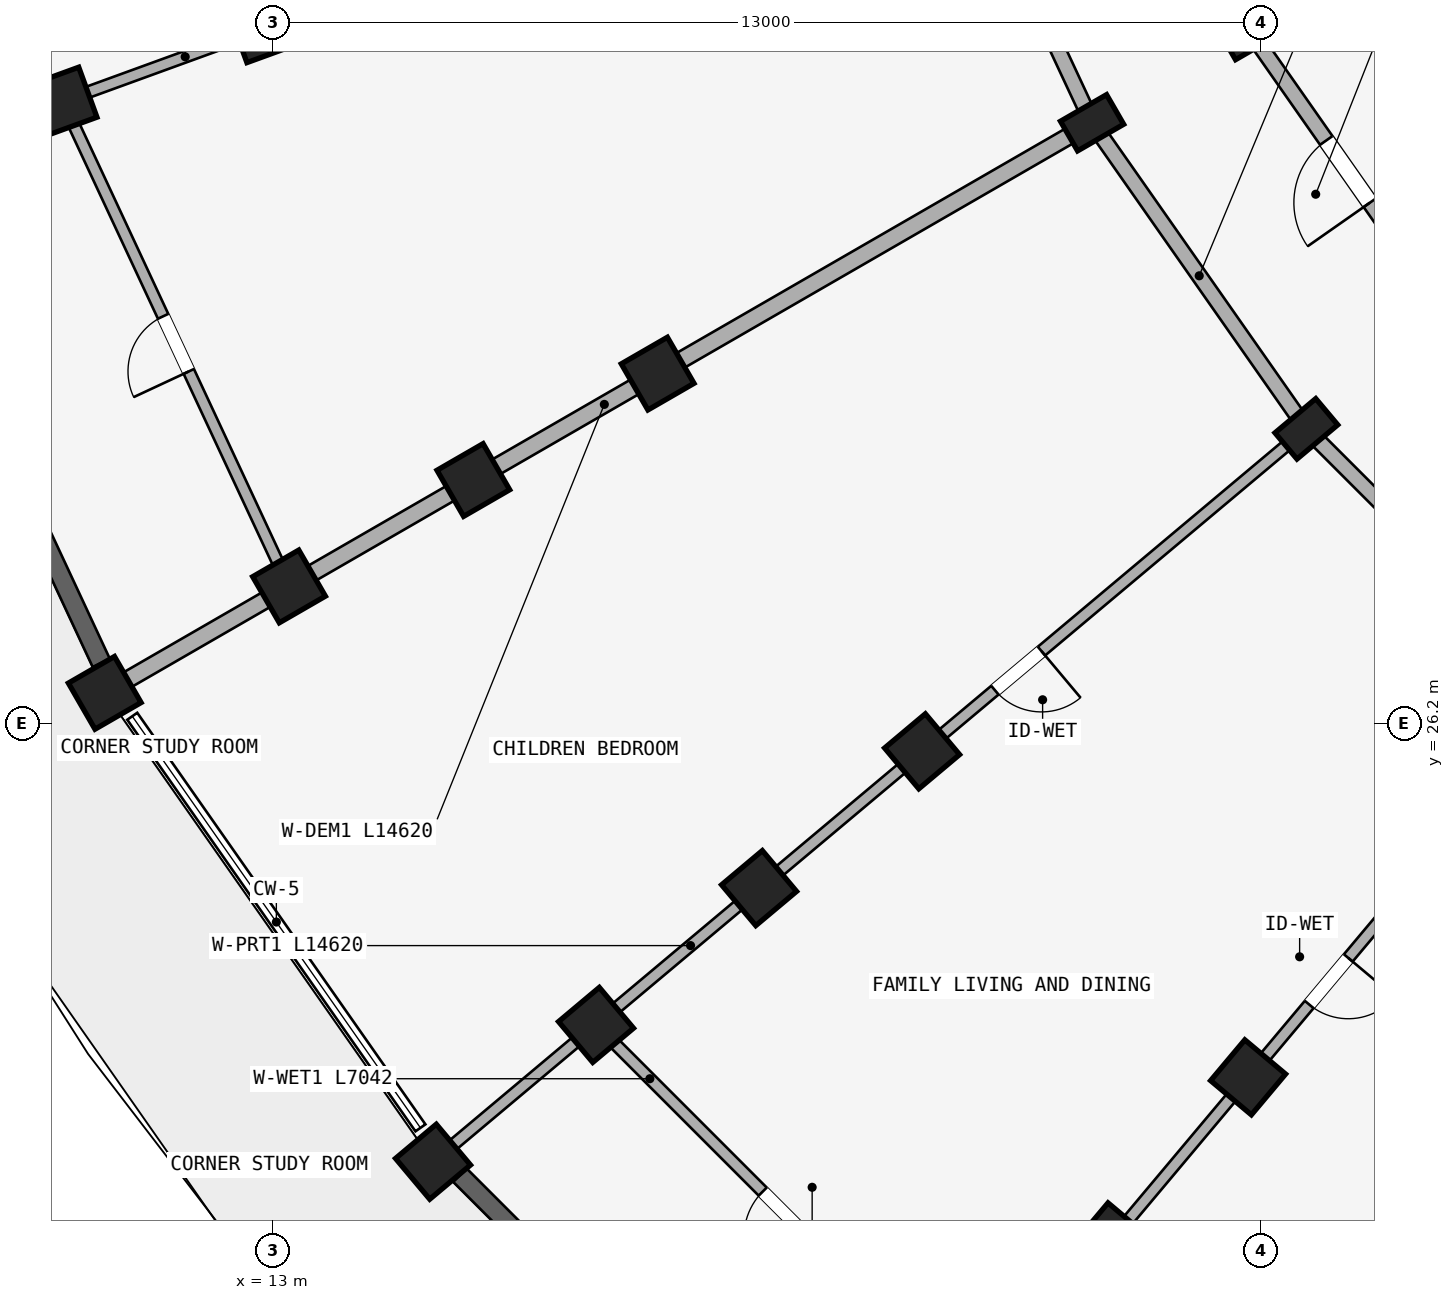
"""IFC4 building model, lengths in metres.
Left out: names, types, materials, properties, quantities, classifications, styles, units other than length and angle.
Written with IfcOpenShell. Run it as: python <this file> out.ifc"""

import sys

from ifc_helpers import new_model, si_unit, direction, frame, frame_2d, origin, origin_2d, place, context, subcontext, project, spatial, rectangle, extrude, element, fill, save


model = new_model("IFC4")
c1 = context("Model", 3, precision=1e-05, world=origin(), true_north=direction((0.0, 1.0)))
c2 = subcontext(c1, "Body", "Model", "MODEL_VIEW")
j1 = project(units=[si_unit("LENGTHUNIT", "METRE"), si_unit("PLANEANGLEUNIT", "RADIAN")], contexts=[c1])
p1 = place(None, origin())
s1 = spatial("IfcSite", under=j1, at=p1, CompositionType="ELEMENT")
p2 = place(p1, origin())
s2 = spatial("IfcBuilding", under=s1, at=p2, CompositionType="ELEMENT")
p3 = place(p2, frame((0.0, 0.0, 21.3)))
s3 = spatial("IfcBuildingStorey", under=s2, at=p3, CompositionType="ELEMENT", Elevation=21.3)
for number, where, z_axis, x_axis in (
    (1, (25.831, 21.542, 0.0), (0.0, 0.0, 1.0), (-0.766, 0.643, 0.0)),
    (2, (24.031, 19.397, 0.0), (0.0, 0.0, 1.0), (-0.766, 0.643, 0.0)),
):
    element("IfcColumn", number, at=place(p3, frame(where, z_axis=z_axis, x_axis=x_axis)), inside=s3, PredefinedType="COLUMN", context=c2, shape_type="SweptSolid", body=[
        extrude(rectangle(XDim=0.7, YDim=0.7, at=origin_2d()), origin(), (0.0, 0.0, 1.0), 2.93),
    ])
p4 = place(p3, frame((26.598, 30.073, 0.0), z_axis=(0.0, 0.0, 1.0), x_axis=(-0.642787609687, 0.766044443119, 0.0)))
e3 = element("IfcColumn", 3, at=p4, inside=s3, PredefinedType="COLUMN", context=c2, shape_type="SweptSolid", body=[
    extrude(rectangle(XDim=0.45, YDim=0.7, at=origin_2d()), origin(), (0.0, 0.0, 1.0), 2.93),
])
for number, where, z_axis, x_axis in (
    (4, (21.542, 25.831, 0.0), (0.0, 0.0, 1.0), (-0.643, 0.766, 0.0)),
    (5, (19.397, 24.031, 0.0), (0.0, 0.0, 1.0), (-0.643, 0.766, 0.0)),
    (6, (17.252, 22.231, 0.0), (0.0, 0.0, 1.0), (-0.643, 0.766, 0.0)),
):
    element("IfcColumn", number, at=place(p3, frame(where, z_axis=z_axis, x_axis=x_axis)), inside=s3, PredefinedType="COLUMN", context=c2, shape_type="SweptSolid", body=[
        extrude(rectangle(XDim=0.7, YDim=0.7, at=origin_2d()), origin(), (0.0, 0.0, 1.0), 2.93),
    ])
p5 = place(p3, frame((15.107, 20.432, 0.0), z_axis=(0.0, 0.0, 1.0), x_axis=(-0.642787609687, 0.766044443119, 0.0)))
e7 = element("IfcColumn", 7, at=p5, inside=s3, PredefinedType="COLUMN", context=c2, shape_type="SweptSolid", body=[
    extrude(rectangle(XDim=0.7, YDim=0.7, at=origin_2d()), origin(), (0.0, 0.0, 1.0), 2.97),
])
for number, where, z_axis, x_axis in (
    (8, (25.856, 35.3, 0.0), (0.0, 0.0, 1.0), (-0.5, 0.866, 0.0)),
    (9, (23.778, 34.1, 0.0), (0.0, 0.0, 1.0), (-0.5, 0.866, 0.0)),
):
    element("IfcColumn", number, at=place(p3, frame(where, z_axis=z_axis, x_axis=x_axis)), inside=s3, PredefinedType="COLUMN", context=c2, shape_type="SweptSolid", body=[
        extrude(rectangle(XDim=0.45, YDim=0.7, at=origin_2d()), origin(), (0.0, 0.0, 1.0), 2.93),
    ])
for number, where, z_axis, x_axis in (
    (10, (18.062, 30.8, 0.0), (0.0, 0.0, 1.0), (-0.5, 0.866, 0.0)),
    (11, (15.637, 29.4, 0.0), (0.0, 0.0, 1.0), (-0.5, 0.866, 0.0)),
    (12, (13.213, 28.0, 0.0), (0.0, 0.0, 1.0), (-0.5, 0.866, 0.0)),
):
    element("IfcColumn", number, at=place(p3, frame(where, z_axis=z_axis, x_axis=x_axis)), inside=s3, PredefinedType="COLUMN", context=c2, shape_type="SweptSolid", body=[
        extrude(rectangle(XDim=0.7, YDim=0.7, at=origin_2d()), origin(), (0.0, 0.0, 1.0), 2.93),
    ])
p6 = place(p3, frame((10.788, 26.6, 0.0), z_axis=(0.0, 0.0, 1.0), x_axis=(-0.5, 0.866025403784, 0.0)))
e13 = element("IfcColumn", 13, at=p6, inside=s3, PredefinedType="COLUMN", context=c2, shape_type="SweptSolid", body=[
    extrude(rectangle(XDim=0.7, YDim=0.7, at=origin_2d()), origin(), (0.0, 0.0, 1.0), 2.97),
])
for number, where, z_axis, x_axis in (
    (14, (12.868, 35.34, 0.0), (0.0, 0.0, 1.0), (-0.342, 0.94, 0.0)),
    (15, (10.236, 34.382, 0.0), (0.0, 0.0, 1.0), (-0.342, 0.94, 0.0)),
):
    element("IfcColumn", number, at=place(p3, frame(where, z_axis=z_axis, x_axis=x_axis)), inside=s3, PredefinedType="COLUMN", context=c2, shape_type="SweptSolid", body=[
        extrude(rectangle(XDim=0.7, YDim=0.7, at=origin_2d()), origin(), (0.0, 0.0, 1.0), 2.93),
    ])
p7 = place(p3, frame((30.073, 26.598, 0.0), z_axis=(0.0, 0.0, 1.0), x_axis=(-0.707106781187, 0.707106781187, 0.0)))
e16 = element("IfcWall", 16, at=p7, inside=s3, PredefinedType="STANDARD", context=c2, shape_type="SweptSolid", body=[
    extrude(rectangle(XDim=4.916, YDim=0.2, at=frame_2d((2.458, 0.0))), origin(), (0.0, 0.0, 1.0), 2.372),
])
p8 = place(p3, frame((28.436, 31.616, 0.0), z_axis=(0.0, 0.0, 1.0), x_axis=(-0.573571637217, 0.819155404658, 0.0)))
e17 = element("IfcWall", 17, at=p8, inside=s3, PredefinedType="STANDARD", context=c2, shape_type="SweptSolid", body=[
    extrude(rectangle(XDim=4.497, YDim=0.2, at=frame_2d((2.249, 0.0))), origin(), (0.0, 0.0, 1.0), 2.372),
])
p9 = place(p8, frame((1.749, 0.0, 0.0)))
e18 = element("IfcOpeningElement", 18, at=p9, cuts=e17, PredefinedType="OPENING", context=c2, shape_type="SweptSolid", body=[
    extrude(rectangle(XDim=1.0, YDim=2.15, at=frame_2d((0.5, 1.075))), frame((0.0, 0.11, 0.0), z_axis=(0.0, -1.0, 0.0), x_axis=(1.0, 0.0, 0.0)), (0.0, 0.0, 1.0), 0.22),
])
p10 = place(p3, frame((26.598, 30.073, 0.0), z_axis=(0.0, 0.0, 1.0), x_axis=(-0.573592335331, 0.819140911474, 0.0)))
e19 = element("IfcWall", 19, at=p10, inside=s3, PredefinedType="STANDARD", context=c2, shape_type="SweptSolid", body=[
    extrude(rectangle(XDim=4.916, YDim=0.2, at=frame_2d((2.458, 0.0))), origin(), (0.0, 0.0, 1.0), 2.372),
])
p11 = place(p3, frame((23.778, 34.1, 0.0), z_axis=(0.0, 0.0, 1.0), x_axis=(-0.422629854778, 0.906302381024, 0.0)))
e20 = element("IfcWall", 20, at=p11, inside=s3, PredefinedType="STANDARD", context=c2, shape_type="SweptSolid", body=[
    extrude(rectangle(XDim=4.915, YDim=0.2, at=frame_2d((2.458, 0.0))), origin(), (0.0, 0.0, 1.0), 2.372),
])
p12 = place(p11, frame((1.888, 0.0, 0.0)))
e21 = element("IfcOpeningElement", 21, at=p12, cuts=e20, PredefinedType="OPENING", context=c2, shape_type="SweptSolid", body=[
    extrude(rectangle(XDim=1.14, YDim=2.15, at=frame_2d((0.57, 1.075))), frame((0.0, 0.11, 0.0), z_axis=(0.0, -1.0, 0.0), x_axis=(1.0, 0.0, 0.0)), (0.0, 0.0, 1.0), 0.22),
])
p13 = place(p3, frame((34.05, 23.691, 0.0), z_axis=(0.0, 0.0, 1.0), x_axis=(-0.500007702989, -0.866020956416, 0.0)))
e22 = element("IfcWall", 22, at=p13, inside=s3, PredefinedType="STANDARD", context=c2, shape_type="SweptSolid", body=[
    extrude(rectangle(XDim=14.62, YDim=0.22, at=frame_2d((7.31, 0.0))), origin(), (0.0, 0.0, 1.0), 2.372),
])
p14 = place(p3, frame((30.009, 26.521, 0.0), z_axis=(0.0, 0.0, 1.0), x_axis=(-0.642779216656, -0.76605148563, 0.0)))
e23 = element("IfcWall", 23, at=p14, inside=s3, PredefinedType="PARTITIONING", context=c2, shape_type="SweptSolid", body=[
    extrude(rectangle(XDim=14.62, YDim=0.15, at=frame_2d((7.31, 0.0))), origin(), (0.0, 0.0, 1.0), 2.372),
])
p15 = place(p14, frame((4.449, 0.0, 0.0)))
e24 = element("IfcOpeningElement", 24, at=p15, cuts=e23, PredefinedType="OPENING", context=c2, shape_type="SweptSolid", body=[
    extrude(rectangle(XDim=0.8, YDim=2.1, at=frame_2d((0.4, 1.05))), frame((0.0, 0.085, 0.0), z_axis=(0.0, -1.0, 0.0), x_axis=(1.0, 0.0, 0.0)), (0.0, 0.0, 1.0), 0.17),
])
p16 = place(p3, frame((26.521, 30.009, 0.0), z_axis=(0.0, 0.0, 1.0), x_axis=(-0.76605148563, -0.642779216656, 0.0)))
e25 = element("IfcWall", 25, at=p16, inside=s3, PredefinedType="PARTITIONING", context=c2, shape_type="SweptSolid", body=[
    extrude(rectangle(XDim=14.62, YDim=0.15, at=frame_2d((7.31, 0.0))), origin(), (0.0, 0.0, 1.0), 2.372),
])
p17 = place(p16, frame((4.449, 0.0, 0.0)))
e26 = element("IfcOpeningElement", 26, at=p17, cuts=e25, PredefinedType="OPENING", context=c2, shape_type="SweptSolid", body=[
    extrude(rectangle(XDim=0.8, YDim=2.1, at=frame_2d((0.4, 1.05))), frame((0.0, 0.085, 0.0), z_axis=(0.0, -1.0, 0.0), x_axis=(1.0, 0.0, 0.0)), (0.0, 0.0, 1.0), 0.17),
])
p18 = place(p3, frame((23.691, 34.05, 0.0), z_axis=(0.0, 0.0, 1.0), x_axis=(-0.866020956416, -0.500007702989, 0.0)))
e27 = element("IfcWall", 27, at=p18, inside=s3, PredefinedType="STANDARD", context=c2, shape_type="SweptSolid", body=[
    extrude(rectangle(XDim=14.62, YDim=0.22, at=frame_2d((7.31, 0.0))), origin(), (0.0, 0.0, 1.0), 2.372),
])
p19 = place(p3, frame((21.607, 38.521, 0.0), z_axis=(0.0, 0.0, 1.0), x_axis=(-0.939694408106, -0.342015232663, 0.0)))
e28 = element("IfcWall", 28, at=p19, inside=s3, PredefinedType="PARTITIONING", context=c2, shape_type="SweptSolid", body=[
    extrude(rectangle(XDim=14.62, YDim=0.15, at=frame_2d((7.31, 0.0))), origin(), (0.0, 0.0, 1.0), 2.372),
])
p20 = place(p19, frame((4.449, 0.0, 0.0)))
e29 = element("IfcOpeningElement", 29, at=p20, cuts=e28, PredefinedType="OPENING", context=c2, shape_type="SweptSolid", body=[
    extrude(rectangle(XDim=0.8, YDim=2.1, at=frame_2d((0.4, 1.05))), frame((0.0, 0.085, 0.0), z_axis=(0.0, -1.0, 0.0), x_axis=(1.0, 0.0, 0.0)), (0.0, 0.0, 1.0), 0.17),
])
p21 = place(p3, frame((22.231, 17.252, 0.0), z_axis=(0.0, 0.0, 1.0), x_axis=(-0.707106781187, 0.707106781187, 0.0)))
e30 = element("IfcWall", 30, at=p21, inside=s3, PredefinedType="PLUMBINGWALL", context=c2, shape_type="SweptSolid", body=[
    extrude(rectangle(XDim=7.042, YDim=0.15, at=frame_2d((3.521, 0.0))), origin(), (0.0, 0.0, 1.0), 2.372),
])
p22 = place(p21, frame((3.101, 0.0, 0.0)))
e31 = element("IfcOpeningElement", 31, at=p22, cuts=e30, PredefinedType="OPENING", context=c2, shape_type="SweptSolid", body=[
    extrude(rectangle(XDim=0.84, YDim=2.1, at=frame_2d((0.42, 1.05))), frame((0.0, 0.085, 0.0), z_axis=(0.0, -1.0, 0.0), x_axis=(1.0, 0.0, 0.0)), (0.0, 0.0, 1.0), 0.17),
])
p23 = place(p3, frame((13.213, 28.0, 0.0), z_axis=(0.0, 0.0, 1.0), x_axis=(-0.422640621205, 0.906297360311, 0.0)))
e32 = element("IfcWall", 32, at=p23, inside=s3, PredefinedType="PLUMBINGWALL", context=c2, shape_type="SweptSolid", body=[
    extrude(rectangle(XDim=7.042, YDim=0.15, at=frame_2d((3.521, 0.0))), origin(), (0.0, 0.0, 1.0), 2.372),
])
p24 = place(p23, frame((3.121, 0.0, 0.0)))
e33 = element("IfcOpeningElement", 33, at=p24, cuts=e32, PredefinedType="OPENING", context=c2, shape_type="SweptSolid", body=[
    extrude(rectangle(XDim=0.8, YDim=2.1, at=frame_2d((0.4, 1.05))), frame((0.0, 0.085, 0.0), z_axis=(0.0, -1.0, 0.0), x_axis=(1.0, 0.0, 0.0)), (0.0, 0.0, 1.0), 0.17),
])
p25 = place(p3, frame((20.254, 15.461, 0.0), z_axis=(0.0, 0.0, 1.0), x_axis=(-0.707106781187, 0.707106781187, 0.0)))
e34 = element("IfcWall", 34, at=p25, inside=s3, PredefinedType="STANDARD", context=c2, shape_type="SweptSolid", body=[
    extrude(rectangle(XDim=6.779, YDim=0.25, at=frame_2d((3.389, 0.0))), origin(), (0.0, 0.0, 1.0), 2.48),
])
p26 = place(p25, frame((4.405, 0.0, 0.53)))
e35 = element("IfcOpeningElement", 35, at=p26, cuts=e34, PredefinedType="OPENING", context=c2, shape_type="SweptSolid", body=[
    extrude(rectangle(XDim=1.2, YDim=1.5, at=frame_2d((0.6, 0.75))), frame((0.0, 0.135, 0.0), z_axis=(0.0, -1.0, 0.0), x_axis=(1.0, 0.0, 0.0)), (0.0, 0.0, 1.0), 0.27),
])
p27 = place(p25, frame((1.772, 0.0, 0.0)))
e36 = element("IfcOpeningElement", 36, at=p27, cuts=e34, PredefinedType="OPENING", context=c2, shape_type="SweptSolid", body=[
    extrude(rectangle(XDim=1.2, YDim=2.15, at=frame_2d((0.6, 1.075))), frame((0.0, 0.135, 0.0), z_axis=(0.0, -1.0, 0.0), x_axis=(1.0, 0.0, 0.0)), (0.0, 0.0, 1.0), 0.27),
])
p28 = place(p3, frame((10.742, 26.993, 0.0), z_axis=(0.0, 0.0, 1.0), x_axis=(-0.422613353553, 0.906310075746, 0.0)))
e37 = element("IfcWall", 37, at=p28, inside=s3, PredefinedType="STANDARD", context=c2, shape_type="SweptSolid", body=[
    extrude(rectangle(XDim=6.779, YDim=0.25, at=frame_2d((3.389, 0.0))), origin(), (0.0, 0.0, 1.0), 2.48),
])
p29 = place(p28, frame((2.289, 0.0, 0.38)))
e38 = element("IfcOpeningElement", 38, at=p29, cuts=e37, PredefinedType="OPENING", context=c2, shape_type="SweptSolid", body=[
    extrude(rectangle(XDim=2.2, YDim=1.9, at=frame_2d((1.1, 0.95))), frame((0.0, 0.135, 0.0), z_axis=(0.0, -1.0, 0.0), x_axis=(1.0, 0.0, 0.0)), (0.0, 0.0, 1.0), 0.27),
])
p30 = place(p15, origin())
e39 = element("IfcDoor", 39, at=p30, inside=s3, OperationType="SINGLE_SWING_LEFT", PredefinedType="DOOR", context=c2, shape_type="SweptSolid", body=[
    extrude(rectangle(XDim=0.8, YDim=2.1, at=frame_2d((0.4, 1.05))), frame((0.0, 0.025, 0.0), z_axis=(0.0, -1.0, 0.0), x_axis=(1.0, 0.0, 0.0)), (0.0, 0.0, 1.0), 0.05),
])
fill(e24, e39)
p31 = place(p17, frame((0.8, 0.0, 0.0), z_axis=(0.0, 0.0, 1.0), x_axis=(-1.0, 0.0, 0.0)))
e40 = element("IfcDoor", 40, at=p31, inside=s3, OperationType="SINGLE_SWING_RIGHT", PredefinedType="DOOR", context=c2, shape_type="SweptSolid", body=[
    extrude(rectangle(XDim=0.8, YDim=2.1, at=frame_2d((0.4, 1.05))), frame((0.0, 0.025, 0.0), z_axis=(0.0, -1.0, 0.0), x_axis=(1.0, 0.0, 0.0)), (0.0, 0.0, 1.0), 0.05),
])
fill(e26, e40)
p32 = place(p22, origin())
e41 = element("IfcDoor", 41, at=p32, inside=s3, OperationType="SINGLE_SWING_LEFT", PredefinedType="DOOR", context=c2, shape_type="SweptSolid", body=[
    extrude(rectangle(XDim=0.84, YDim=2.1, at=frame_2d((0.42, 1.05))), frame((0.0, 0.025, 0.0), z_axis=(0.0, -1.0, 0.0), x_axis=(1.0, 0.0, 0.0)), (0.0, 0.0, 1.0), 0.05),
])
fill(e31, e41)
p33 = place(p24, origin())
e42 = element("IfcDoor", 42, at=p33, inside=s3, OperationType="SINGLE_SWING_LEFT", PredefinedType="DOOR", context=c2, shape_type="SweptSolid", body=[
    extrude(rectangle(XDim=0.8, YDim=2.1, at=frame_2d((0.4, 1.05))), frame((0.0, 0.025, 0.0), z_axis=(0.0, -1.0, 0.0), x_axis=(1.0, 0.0, 0.0)), (0.0, 0.0, 1.0), 0.05),
])
fill(e33, e42)
p34 = place(p9, frame((1.0, 0.0, 0.0), z_axis=(0.0, 0.0, 1.0), x_axis=(-1.0, 0.0, 0.0)))
e43 = element("IfcDoor", 43, at=p34, inside=s3, OperationType="SINGLE_SWING_RIGHT", PredefinedType="DOOR", context=c2, shape_type="SweptSolid", body=[
    extrude(rectangle(XDim=1.0, YDim=2.15, at=frame_2d((0.5, 1.075))), frame((0.0, 0.025, 0.0), z_axis=(0.0, -1.0, 0.0), x_axis=(1.0, 0.0, 0.0)), (0.0, 0.0, 1.0), 0.05),
])
fill(e18, e43)
save(model, sys.argv[1])
